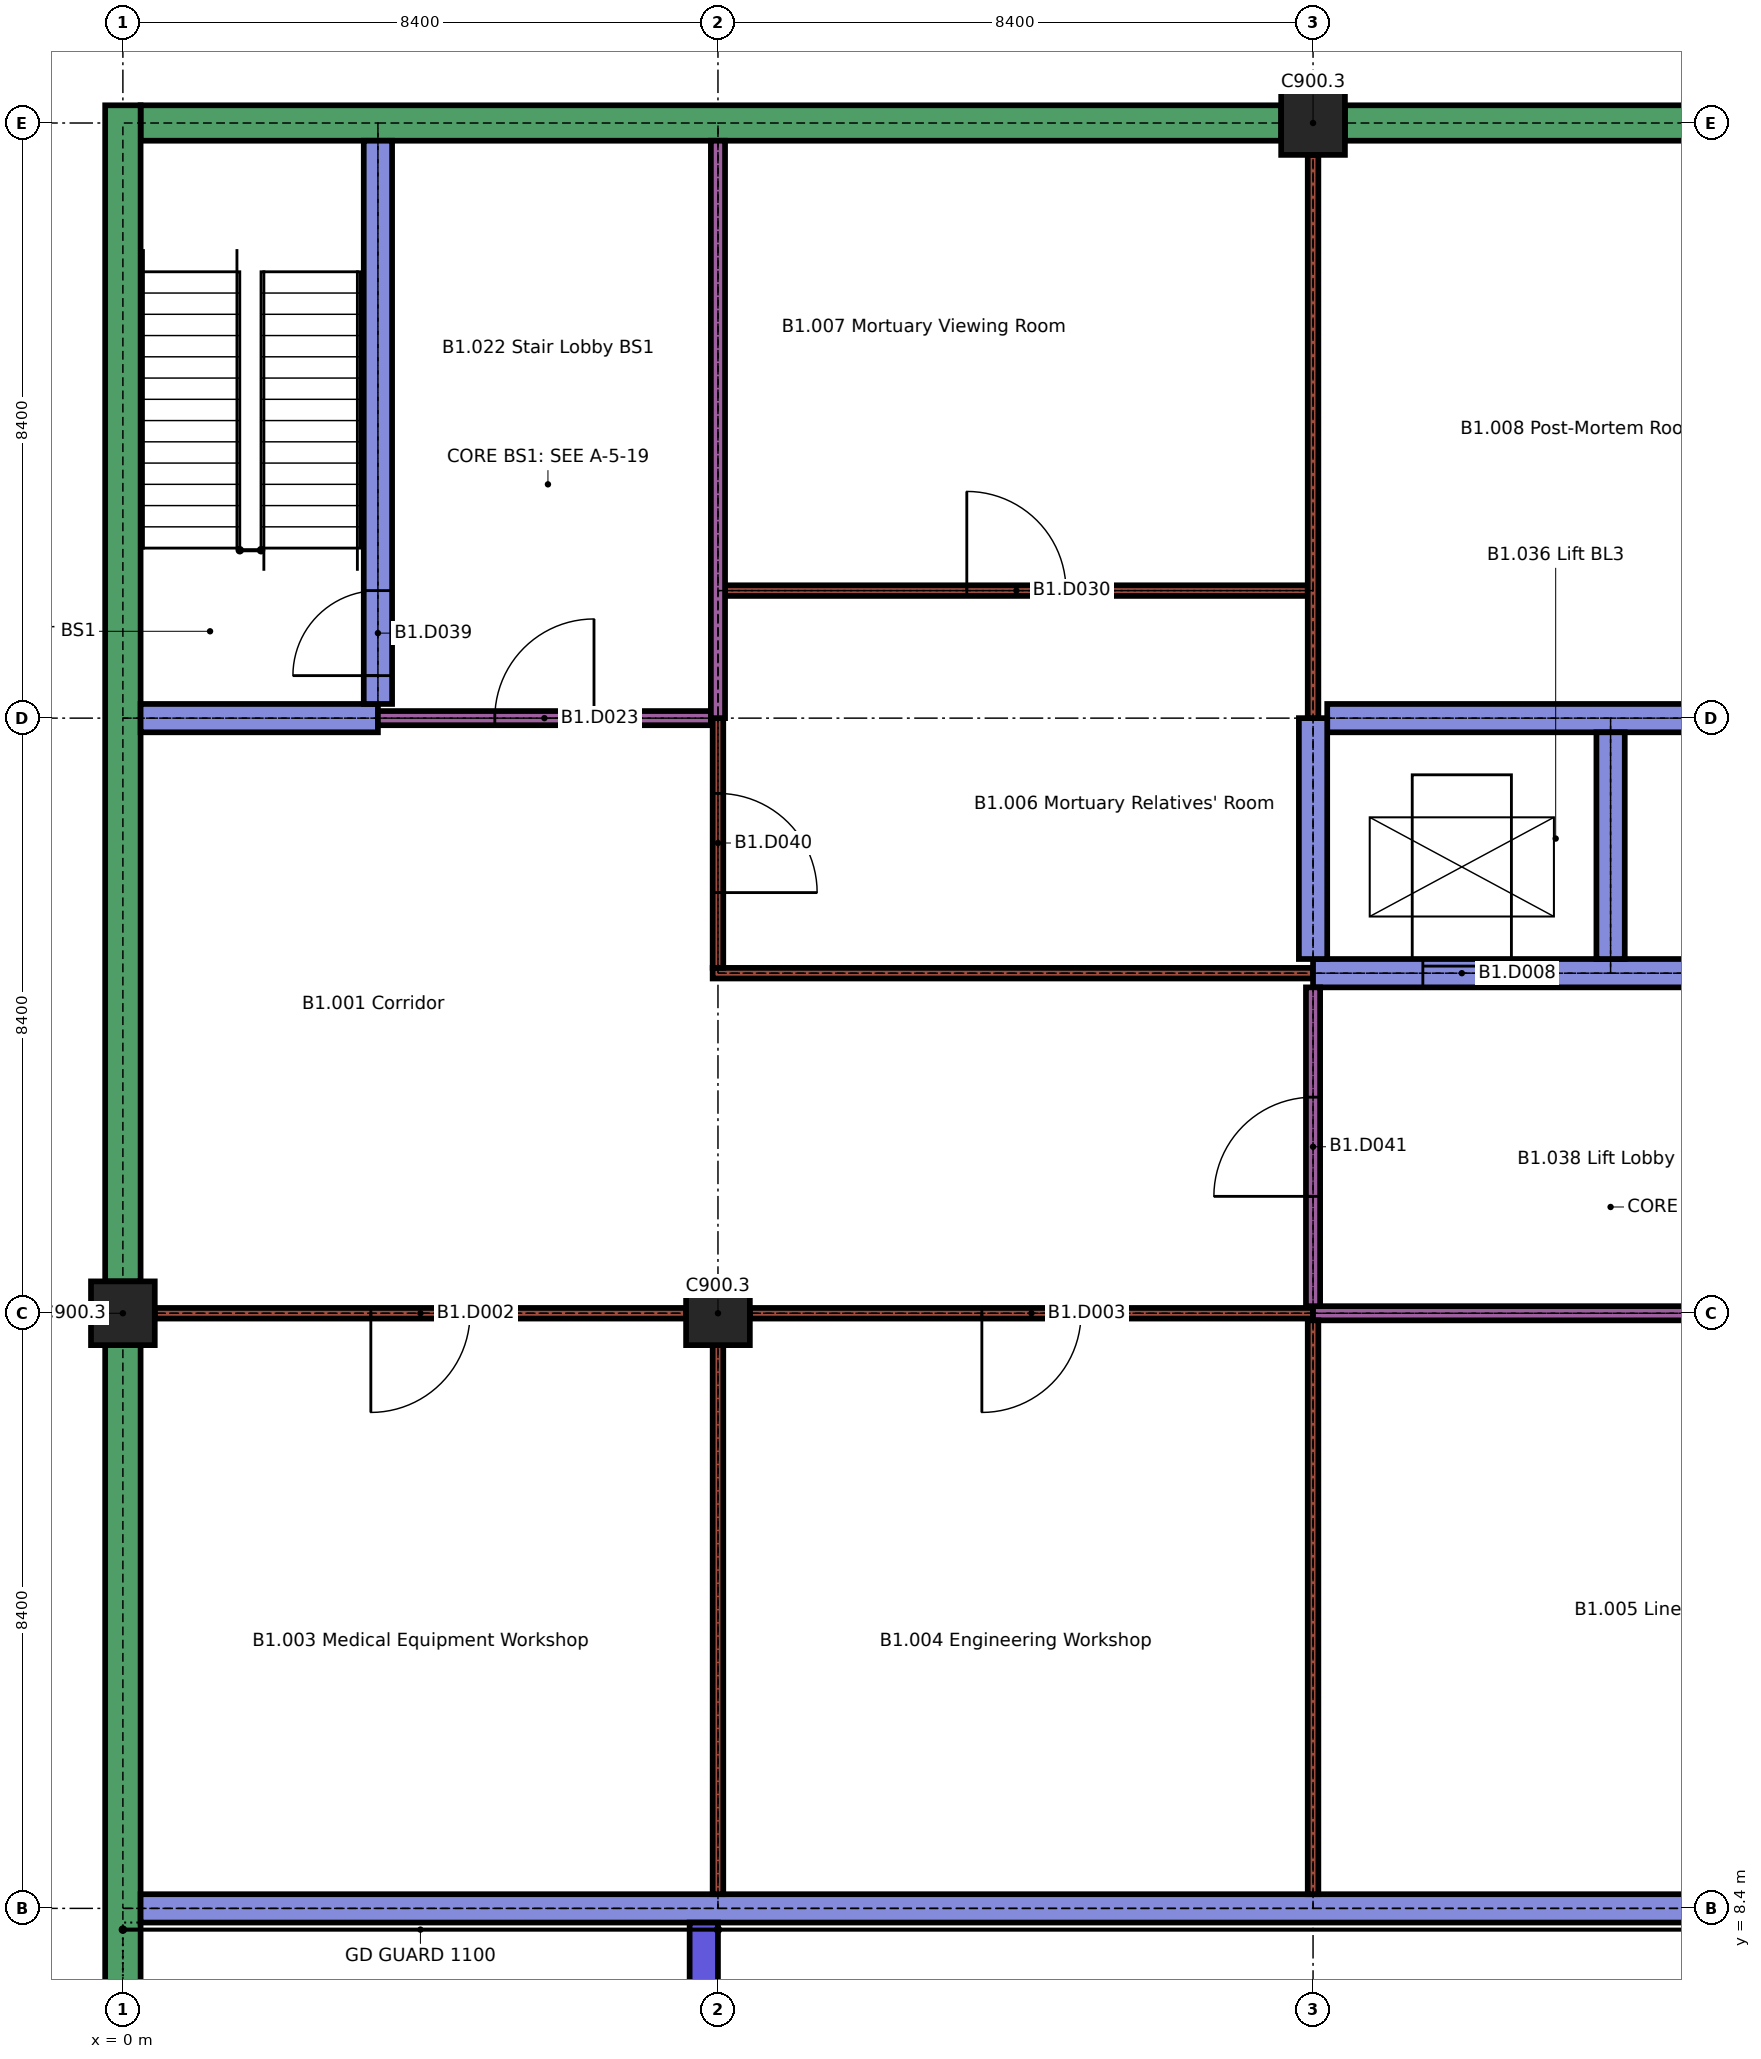
"""IFC4 building model, lengths in metres.
Left out: names, types, materials, properties, quantities, classifications, styles, units other than length and angle.
Written with IfcOpenShell. Run it as: python <this file> out.ifc"""

import sys

from ifc_helpers import new_model, si_unit, direction, frame, frame_2d, origin, origin_2d, place, context, subcontext, project, spatial, rectangle, extrude, element, fill, save


model = new_model("IFC4")
c1 = context("Model", 3, precision=1e-05, world=origin(), true_north=direction((0.0, 1.0)))
c2 = subcontext(c1, "Body", "Model", "MODEL_VIEW")
j1 = project(units=[si_unit("LENGTHUNIT", "METRE"), si_unit("PLANEANGLEUNIT", "RADIAN")], contexts=[c1])
p1 = place(None, origin())
s1 = spatial("IfcSite", under=j1, at=p1, CompositionType="ELEMENT")
p2 = place(p1, origin())
s2 = spatial("IfcBuilding", under=s1, at=p2, CompositionType="ELEMENT")
p3 = place(p2, frame((0.0, 0.0, -4.2)))
s3 = spatial("IfcBuildingStorey", under=s2, at=p3, CompositionType="ELEMENT", Elevation=-4.2)
for number, where, z_axis, x_axis in (
    (1, (0.0, 16.8, 0.0), (0.0, 0.0, 1.0), (1.0, 0.0, 0.0)),
    (2, (8.4, 16.8, 0.0), (0.0, 0.0, 1.0), (1.0, 0.0, 0.0)),
    (3, (16.8, 33.6, 0.0), (0.0, 0.0, 1.0), (1.0, 0.0, 0.0)),
):
    element("IfcColumn", number, at=place(p3, frame(where, z_axis=z_axis, x_axis=x_axis)), inside=s3, PredefinedType="COLUMN", context=c2, shape_type="SweptSolid", body=[
        extrude(rectangle(XDim=0.9, YDim=0.9, at=origin_2d()), origin(), (0.0, 0.0, 1.0), 3.75),
    ])
p4 = place(p3, frame((0.25, 33.6, 0.0), z_axis=(0.0, 0.0, 1.0), x_axis=(1.0, 0.0, 0.0)))
e4 = element("IfcWall", 4, at=p4, inside=s3, PredefinedType="SOLIDWALL", context=c2, shape_type="SweptSolid", body=[
    extrude(rectangle(XDim=16.1, YDim=0.5, at=frame_2d((8.05, 0.0))), origin(), (0.0, 0.0, 1.0), 3.75),
])
p5 = place(p3, frame((17.25, 33.6, 0.0), z_axis=(0.0, 0.0, 1.0), x_axis=(1.0, 0.0, 0.0)))
e5 = element("IfcWall", 5, at=p5, inside=s3, PredefinedType="SOLIDWALL", context=c2, shape_type="SweptSolid", body=[
    extrude(rectangle(XDim=7.5, YDim=0.5, at=frame_2d((3.75, 0.0))), origin(), (0.0, 0.0, 1.0), 3.75),
])
for number, where, z_axis, x_axis in (
    (6, (0.0, -0.25, 0.0), (0.0, 0.0, 1.0), (0.0, 1.0, 0.0)),
    (7, (0.0, 17.25, 0.0), (0.0, 0.0, 1.0), (0.0, 1.0, 0.0)),
):
    element("IfcWall", number, at=place(p3, frame(where, z_axis=z_axis, x_axis=x_axis)), inside=s3, PredefinedType="SOLIDWALL", context=c2, shape_type="SweptSolid", body=[
        extrude(rectangle(XDim=16.6, YDim=0.5, at=frame_2d((8.3, 0.0))), origin(), (0.0, 0.0, 1.0), 3.75),
    ])
p6 = place(p3, frame((0.25, 8.4, 0.0), z_axis=(0.0, 0.0, 1.0), x_axis=(1.0, 0.0, 0.0)))
e8 = element("IfcWall", 8, at=p6, inside=s3, PredefinedType="SHEAR", context=c2, shape_type="SweptSolid", body=[
    extrude(rectangle(XDim=33.15, YDim=0.4, at=frame_2d((16.575, 0.0))), origin(), (0.0, 0.0, 1.0), 3.75),
])
p7 = place(p6, frame((30.15, 0.0, 0.0)))
e9 = element("IfcOpeningElement", 9, at=p7, cuts=e8, PredefinedType="OPENING", context=c2, shape_type="SweptSolid", body=[
    extrude(rectangle(XDim=1.2, YDim=3.0, at=frame_2d((0.6, 1.5))), frame((0.0, 0.21, 0.0), z_axis=(0.0, -1.0, 0.0), x_axis=(1.0, 0.0, 0.0)), (0.0, 0.0, 1.0), 0.42),
])
p8 = place(p3, frame((0.45, 16.8, 0.0), z_axis=(0.0, 0.0, 1.0), x_axis=(1.0, 0.0, 0.0)))
e10 = element("IfcWall", 10, at=p8, inside=s3, PredefinedType="PARTITIONING", context=c2, shape_type="SweptSolid", body=[
    extrude(rectangle(XDim=7.5, YDim=0.15, at=frame_2d((3.75, 0.0))), origin(), (0.0, 0.0, 1.0), 3.75),
])
p9 = place(p8, frame((3.05, 0.0, 0.0)))
e11 = element("IfcOpeningElement", 11, at=p9, cuts=e10, PredefinedType="OPENING", context=c2, shape_type="SweptSolid", body=[
    extrude(rectangle(XDim=1.4, YDim=2.1, at=frame_2d((0.7, 1.05))), frame((0.0, 0.085, 0.0), z_axis=(0.0, -1.0, 0.0), x_axis=(1.0, 0.0, 0.0)), (0.0, 0.0, 1.0), 0.17),
])
p10 = place(p3, frame((8.85, 16.8, 0.0), z_axis=(0.0, 0.0, 1.0), x_axis=(1.0, 0.0, 0.0)))
e12 = element("IfcWall", 12, at=p10, inside=s3, PredefinedType="PARTITIONING", context=c2, shape_type="SweptSolid", body=[
    extrude(rectangle(XDim=7.95, YDim=0.15, at=frame_2d((3.975, 0.0))), origin(), (0.0, 0.0, 1.0), 3.75),
])
p11 = place(p10, frame((3.275, 0.0, 0.0)))
e13 = element("IfcOpeningElement", 13, at=p11, cuts=e12, PredefinedType="OPENING", context=c2, shape_type="SweptSolid", body=[
    extrude(rectangle(XDim=1.4, YDim=2.1, at=frame_2d((0.7, 1.05))), frame((0.0, 0.085, 0.0), z_axis=(0.0, -1.0, 0.0), x_axis=(1.0, 0.0, 0.0)), (0.0, 0.0, 1.0), 0.17),
])
p12 = place(p3, frame((16.8, 16.8, 0.0), z_axis=(0.0, 0.0, 1.0), x_axis=(1.0, 0.0, 0.0)))
e14 = element("IfcWall", 14, at=p12, inside=s3, PredefinedType="PARTITIONING", context=c2, shape_type="SweptSolid", body=[
    extrude(rectangle(XDim=12.5, YDim=0.2, at=frame_2d((6.25, 0.0))), origin(), (0.0, 0.0, 1.0), 3.75),
])
p13 = place(p3, frame((8.325, 21.6, 0.0), z_axis=(0.0, 0.0, 1.0), x_axis=(1.0, 0.0, 0.0)))
e15 = element("IfcWall", 15, at=p13, inside=s3, PredefinedType="PARTITIONING", context=c2, shape_type="SweptSolid", body=[
    extrude(rectangle(XDim=8.475, YDim=0.15, at=frame_2d((4.238, 0.0))), origin(), (0.0, 0.0, 1.0), 3.75),
])
p14 = place(p3, frame((16.8, 21.6, 0.0), z_axis=(0.0, 0.0, 1.0), x_axis=(1.0, 0.0, 0.0)))
e16 = element("IfcWall", 16, at=p14, inside=s3, PredefinedType="SHEAR", context=c2, shape_type="SweptSolid", body=[
    extrude(rectangle(XDim=12.6, YDim=0.4, at=frame_2d((6.3, 0.0))), origin(), (0.0, 0.0, 1.0), 3.75),
])
p15 = place(p14, frame((1.55, 0.0, 0.0)))
e17 = element("IfcOpeningElement", 17, at=p15, cuts=e16, PredefinedType="OPENING", context=c2, shape_type="SweptSolid", body=[
    extrude(rectangle(XDim=1.1, YDim=2.1, at=frame_2d((0.55, 1.05))), frame((0.0, 0.21, 0.0), z_axis=(0.0, -1.0, 0.0), x_axis=(1.0, 0.0, 0.0)), (0.0, 0.0, 1.0), 0.42),
])
p16 = place(p14, frame((5.75, 0.0, 0.0)))
e18 = element("IfcOpeningElement", 18, at=p16, cuts=e16, PredefinedType="OPENING", context=c2, shape_type="SweptSolid", body=[
    extrude(rectangle(XDim=1.1, YDim=2.1, at=frame_2d((0.55, 1.05))), frame((0.0, 0.21, 0.0), z_axis=(0.0, -1.0, 0.0), x_axis=(1.0, 0.0, 0.0)), (0.0, 0.0, 1.0), 0.42),
])
p17 = place(p14, frame((9.95, 0.0, 0.0)))
e19 = element("IfcOpeningElement", 19, at=p17, cuts=e16, PredefinedType="OPENING", context=c2, shape_type="SweptSolid", body=[
    extrude(rectangle(XDim=1.1, YDim=2.1, at=frame_2d((0.55, 1.05))), frame((0.0, 0.21, 0.0), z_axis=(0.0, -1.0, 0.0), x_axis=(1.0, 0.0, 0.0)), (0.0, 0.0, 1.0), 0.42),
])
p18 = place(p3, frame((0.25, 25.2, 0.0), z_axis=(0.0, 0.0, 1.0), x_axis=(1.0, 0.0, 0.0)))
e20 = element("IfcWall", 20, at=p18, inside=s3, PredefinedType="SHEAR", context=c2, shape_type="SweptSolid", body=[
    extrude(rectangle(XDim=3.35, YDim=0.4, at=frame_2d((1.675, 0.0))), origin(), (0.0, 0.0, 1.0), 3.75),
])
p19 = place(p3, frame((3.6, 25.2, 0.0), z_axis=(0.0, 0.0, 1.0), x_axis=(1.0, 0.0, 0.0)))
e21 = element("IfcWall", 21, at=p19, inside=s3, PredefinedType="PARTITIONING", context=c2, shape_type="SweptSolid", body=[
    extrude(rectangle(XDim=4.7, YDim=0.2, at=frame_2d((2.35, 0.0))), origin(), (0.0, 0.0, 1.0), 3.75),
])
p20 = place(p19, frame((1.65, 0.0, 0.0)))
e22 = element("IfcOpeningElement", 22, at=p20, cuts=e21, PredefinedType="OPENING", context=c2, shape_type="SweptSolid", body=[
    extrude(rectangle(XDim=1.4, YDim=2.1, at=frame_2d((0.7, 1.05))), frame((0.0, 0.11, 0.0), z_axis=(0.0, -1.0, 0.0), x_axis=(1.0, 0.0, 0.0)), (0.0, 0.0, 1.0), 0.22),
])
p21 = place(p3, frame((17.0, 25.2, 0.0), z_axis=(0.0, 0.0, 1.0), x_axis=(1.0, 0.0, 0.0)))
e23 = element("IfcWall", 23, at=p21, inside=s3, PredefinedType="SHEAR", context=c2, shape_type="SweptSolid", body=[
    extrude(rectangle(XDim=12.6, YDim=0.4, at=frame_2d((6.3, 0.0))), origin(), (0.0, 0.0, 1.0), 3.75),
])
p22 = place(p3, frame((8.5, 27.0, 0.0), z_axis=(0.0, 0.0, 1.0), x_axis=(1.0, 0.0, 0.0)))
e24 = element("IfcWall", 24, at=p22, inside=s3, PredefinedType="PARTITIONING", context=c2, shape_type="SweptSolid", body=[
    extrude(rectangle(XDim=8.225, YDim=0.15, at=frame_2d((4.113, 0.0))), origin(), (0.0, 0.0, 1.0), 3.75),
])
p23 = place(p22, frame((3.413, 0.0, 0.0)))
e25 = element("IfcOpeningElement", 25, at=p23, cuts=e24, PredefinedType="OPENING", context=c2, shape_type="SweptSolid", body=[
    extrude(rectangle(XDim=1.4, YDim=2.1, at=frame_2d((0.7, 1.05))), frame((0.0, 0.085, 0.0), z_axis=(0.0, -1.0, 0.0), x_axis=(1.0, 0.0, 0.0)), (0.0, 0.0, 1.0), 0.17),
])
p24 = place(p3, frame((3.6, 25.4, 0.0), z_axis=(0.0, 0.0, 1.0), x_axis=(0.0, 1.0, 0.0)))
e26 = element("IfcWall", 26, at=p24, inside=s3, PredefinedType="SHEAR", context=c2, shape_type="SweptSolid", body=[
    extrude(rectangle(XDim=7.95, YDim=0.4, at=frame_2d((3.975, 0.0))), origin(), (0.0, 0.0, 1.0), 3.75),
])
p25 = place(p24, frame((0.4, 0.0, 0.0)))
e27 = element("IfcOpeningElement", 27, at=p25, cuts=e26, PredefinedType="OPENING", context=c2, shape_type="SweptSolid", body=[
    extrude(rectangle(XDim=1.2, YDim=2.1, at=frame_2d((0.6, 1.05))), frame((0.0, 0.21, 0.0), z_axis=(0.0, -1.0, 0.0), x_axis=(1.0, 0.0, 0.0)), (0.0, 0.0, 1.0), 0.42),
])
p26 = place(p3, frame((8.4, 8.6, 0.0), z_axis=(0.0, 0.0, 1.0), x_axis=(0.0, 1.0, 0.0)))
e28 = element("IfcWall", 28, at=p26, inside=s3, PredefinedType="PARTITIONING", context=c2, shape_type="SweptSolid", body=[
    extrude(rectangle(XDim=7.75, YDim=0.15, at=frame_2d((3.875, 0.0))), origin(), (0.0, 0.0, 1.0), 3.75),
])
p27 = place(p3, frame((8.4, 21.675, 0.0), z_axis=(0.0, 0.0, 1.0), x_axis=(0.0, 1.0, 0.0)))
e29 = element("IfcWall", 29, at=p27, inside=s3, PredefinedType="PARTITIONING", context=c2, shape_type="SweptSolid", body=[
    extrude(rectangle(XDim=3.525, YDim=0.15, at=frame_2d((1.762, 0.0))), origin(), (0.0, 0.0, 1.0), 3.75),
])
p28 = place(p27, frame((1.062, 0.0, 0.0)))
e30 = element("IfcOpeningElement", 30, at=p28, cuts=e29, PredefinedType="OPENING", context=c2, shape_type="SweptSolid", body=[
    extrude(rectangle(XDim=1.4, YDim=2.1, at=frame_2d((0.7, 1.05))), frame((0.0, 0.085, 0.0), z_axis=(0.0, -1.0, 0.0), x_axis=(1.0, 0.0, 0.0)), (0.0, 0.0, 1.0), 0.17),
])
p29 = place(p3, frame((8.4, 25.2, 0.0), z_axis=(0.0, 0.0, 1.0), x_axis=(0.0, 1.0, 0.0)))
e31 = element("IfcWall", 31, at=p29, inside=s3, PredefinedType="PARTITIONING", context=c2, shape_type="SweptSolid", body=[
    extrude(rectangle(XDim=8.15, YDim=0.2, at=frame_2d((4.075, 0.0))), origin(), (0.0, 0.0, 1.0), 3.75),
])
p30 = place(p3, frame((16.8, 8.6, 0.0), z_axis=(0.0, 0.0, 1.0), x_axis=(0.0, 1.0, 0.0)))
e32 = element("IfcWall", 32, at=p30, inside=s3, PredefinedType="PARTITIONING", context=c2, shape_type="SweptSolid", body=[
    extrude(rectangle(XDim=8.1, YDim=0.15, at=frame_2d((4.05, 0.0))), origin(), (0.0, 0.0, 1.0), 3.75),
])
p31 = place(p3, frame((16.8, 16.9, 0.0), z_axis=(0.0, 0.0, 1.0), x_axis=(0.0, 1.0, 0.0)))
e33 = element("IfcWall", 33, at=p31, inside=s3, PredefinedType="PARTITIONING", context=c2, shape_type="SweptSolid", body=[
    extrude(rectangle(XDim=4.5, YDim=0.2, at=frame_2d((2.25, 0.0))), origin(), (0.0, 0.0, 1.0), 3.75),
])
p32 = place(p31, frame((1.55, 0.0, 0.0)))
e34 = element("IfcOpeningElement", 34, at=p32, cuts=e33, PredefinedType="OPENING", context=c2, shape_type="SweptSolid", body=[
    extrude(rectangle(XDim=1.4, YDim=2.1, at=frame_2d((0.7, 1.05))), frame((0.0, 0.11, 0.0), z_axis=(0.0, -1.0, 0.0), x_axis=(1.0, 0.0, 0.0)), (0.0, 0.0, 1.0), 0.22),
])
p33 = place(p3, frame((16.8, 21.8, 0.0), z_axis=(0.0, 0.0, 1.0), x_axis=(0.0, 1.0, 0.0)))
e35 = element("IfcWall", 35, at=p33, inside=s3, PredefinedType="SHEAR", context=c2, shape_type="SweptSolid", body=[
    extrude(rectangle(XDim=3.4, YDim=0.4, at=frame_2d((1.7, 0.0))), origin(), (0.0, 0.0, 1.0), 3.75),
])
p34 = place(p3, frame((16.8, 25.2, 0.0), z_axis=(0.0, 0.0, 1.0), x_axis=(0.0, 1.0, 0.0)))
e36 = element("IfcWall", 36, at=p34, inside=s3, PredefinedType="PARTITIONING", context=c2, shape_type="SweptSolid", body=[
    extrude(rectangle(XDim=7.95, YDim=0.15, at=frame_2d((3.975, 0.0))), origin(), (0.0, 0.0, 1.0), 3.75),
])
p35 = place(p3, frame((21.0, 21.8, 0.0), z_axis=(0.0, 0.0, 1.0), x_axis=(0.0, 1.0, 0.0)))
e37 = element("IfcWall", 37, at=p35, inside=s3, PredefinedType="SHEAR", context=c2, shape_type="SweptSolid", body=[
    extrude(rectangle(XDim=3.2, YDim=0.4, at=frame_2d((1.6, 0.0))), origin(), (0.0, 0.0, 1.0), 3.75),
])
p36 = place(p3, frame((8.2, 0.2, 0.0), z_axis=(0.0, 0.0, 1.0), x_axis=(0.0, 1.0, 0.0)))
e38 = element("IfcWall", 38, at=p36, inside=s3, PredefinedType="SOLIDWALL", context=c2, shape_type="SweptSolid", body=[
    extrude(rectangle(XDim=8.0, YDim=0.4, at=frame_2d((4.0, 0.0))), origin(), (0.0, 0.0, 1.0), 3.099),
])
p37 = place(p9, origin())
e39 = element("IfcDoor", 39, at=p37, inside=s3, OperationType="SINGLE_SWING_LEFT", PredefinedType="DOOR", context=c2, shape_type="SweptSolid", body=[
    extrude(rectangle(XDim=1.4, YDim=2.1, at=frame_2d((0.7, 1.05))), frame((0.0, 0.025, 0.0), z_axis=(0.0, -1.0, 0.0), x_axis=(1.0, 0.0, 0.0)), (0.0, 0.0, 1.0), 0.05),
])
fill(e11, e39)
p38 = place(p11, origin())
e40 = element("IfcDoor", 40, at=p38, inside=s3, OperationType="SINGLE_SWING_LEFT", PredefinedType="DOOR", context=c2, shape_type="SweptSolid", body=[
    extrude(rectangle(XDim=1.4, YDim=2.1, at=frame_2d((0.7, 1.05))), frame((0.0, 0.025, 0.0), z_axis=(0.0, -1.0, 0.0), x_axis=(1.0, 0.0, 0.0)), (0.0, 0.0, 1.0), 0.05),
])
fill(e13, e40)
p39 = place(p15, origin())
e41 = element("IfcDoor", 41, at=p39, inside=s3, OperationType="SLIDING_TO_LEFT", PredefinedType="DOOR", context=c2, shape_type="SweptSolid", body=[
    extrude(rectangle(XDim=1.1, YDim=2.1, at=frame_2d((0.55, 1.05))), frame((0.0, 0.025, 0.0), z_axis=(0.0, -1.0, 0.0), x_axis=(1.0, 0.0, 0.0)), (0.0, 0.0, 1.0), 0.05),
])
fill(e17, e41)
p40 = place(p20, origin())
e42 = element("IfcDoor", 42, at=p40, inside=s3, OperationType="SINGLE_SWING_LEFT", PredefinedType="DOOR", context=c2, shape_type="SweptSolid", body=[
    extrude(rectangle(XDim=1.4, YDim=2.1, at=frame_2d((0.7, 1.05))), frame((0.0, 0.03, 0.0), z_axis=(0.0, -1.0, 0.0), x_axis=(1.0, 0.0, 0.0)), (0.0, 0.0, 1.0), 0.06),
])
fill(e22, e42)
p41 = place(p23, origin())
e43 = element("IfcDoor", 43, at=p41, inside=s3, OperationType="SINGLE_SWING_RIGHT", PredefinedType="DOOR", context=c2, shape_type="SweptSolid", body=[
    extrude(rectangle(XDim=1.4, YDim=2.1, at=frame_2d((0.7, 1.05))), frame((0.0, 0.025, 0.0), z_axis=(0.0, -1.0, 0.0), x_axis=(1.0, 0.0, 0.0)), (0.0, 0.0, 1.0), 0.05),
])
fill(e25, e43)
p42 = place(p25, origin())
e44 = element("IfcDoor", 44, at=p42, inside=s3, OperationType="SINGLE_SWING_RIGHT", PredefinedType="DOOR", context=c2, shape_type="SweptSolid", body=[
    extrude(rectangle(XDim=1.2, YDim=2.1, at=frame_2d((0.6, 1.05))), frame((0.0, 0.025, 0.0), z_axis=(0.0, -1.0, 0.0), x_axis=(1.0, 0.0, 0.0)), (0.0, 0.0, 1.0), 0.05),
])
fill(e27, e44)
p43 = place(p28, origin())
e45 = element("IfcDoor", 45, at=p43, inside=s3, OperationType="SINGLE_SWING_LEFT", PredefinedType="DOOR", context=c2, shape_type="SweptSolid", body=[
    extrude(rectangle(XDim=1.4, YDim=2.1, at=frame_2d((0.7, 1.05))), frame((0.0, 0.025, 0.0), z_axis=(0.0, -1.0, 0.0), x_axis=(1.0, 0.0, 0.0)), (0.0, 0.0, 1.0), 0.05),
])
fill(e30, e45)
p44 = place(p32, origin())
e46 = element("IfcDoor", 46, at=p44, inside=s3, OperationType="SINGLE_SWING_RIGHT", PredefinedType="DOOR", context=c2, shape_type="SweptSolid", body=[
    extrude(rectangle(XDim=1.4, YDim=2.1, at=frame_2d((0.7, 1.05))), frame((0.0, 0.03, 0.0), z_axis=(0.0, -1.0, 0.0), x_axis=(1.0, 0.0, 0.0)), (0.0, 0.0, 1.0), 0.06),
])
fill(e34, e46)
save(model, sys.argv[1])
